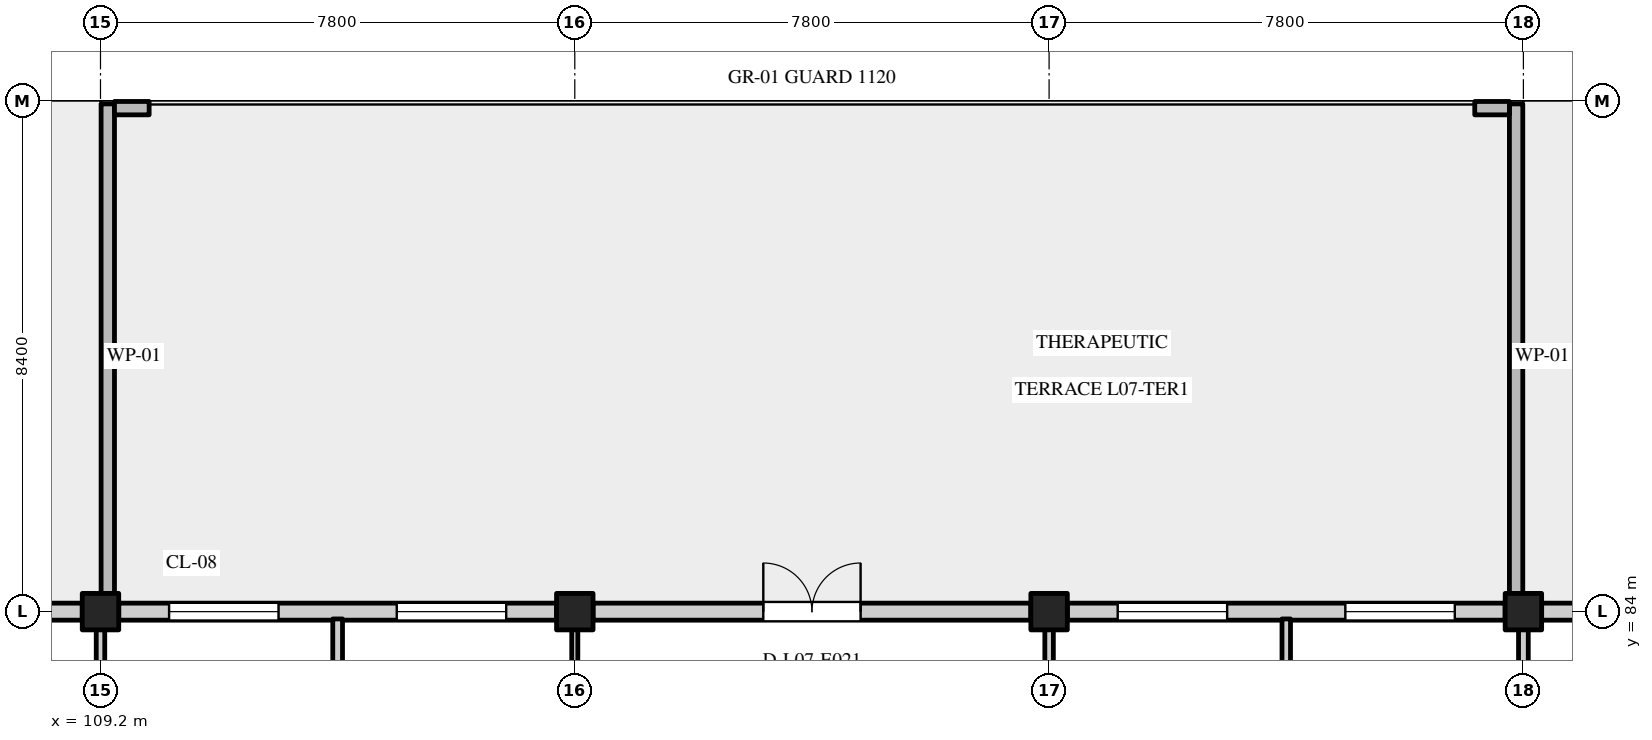
"""IFC4 building model, lengths in metres.
Left out: names, types, materials, properties, quantities, classifications, styles, units other than length and angle.
Written with IfcOpenShell. Run it as: python <this file> out.ifc"""

import sys

from ifc_helpers import new_model, si_unit, direction, frame, frame_2d, origin, origin_2d, place, context, subcontext, project, spatial, rectangle, extrude, element, fill, save


model = new_model("IFC4")
c1 = context("Model", 3, precision=1e-05, world=origin(), true_north=direction((0.0, 1.0)))
c2 = subcontext(c1, "Body", "Model", "MODEL_VIEW")
j1 = project(units=[si_unit("LENGTHUNIT", "METRE"), si_unit("PLANEANGLEUNIT", "RADIAN")], contexts=[c1])
p1 = place(None, origin())
s1 = spatial("IfcSite", under=j1, at=p1, CompositionType="ELEMENT")
p2 = place(p1, origin())
s2 = spatial("IfcBuilding", under=s1, at=p2, CompositionType="ELEMENT")
p3 = place(p2, frame((0.0, 0.0, 29.7)))
s3 = spatial("IfcBuildingStorey", under=s2, at=p3, CompositionType="ELEMENT", Elevation=29.7)
for number, where, z_axis, x_axis in (
    (1, (109.2, 84.0, 0.0), (0.0, 0.0, 1.0), (1.0, 0.0, 0.0)),
    (2, (117.0, 84.0, 0.0), (0.0, 0.0, 1.0), (1.0, 0.0, 0.0)),
    (3, (124.8, 84.0, 0.0), (0.0, 0.0, 1.0), (1.0, 0.0, 0.0)),
    (4, (132.6, 84.0, 0.0), (0.0, 0.0, 1.0), (1.0, 0.0, 0.0)),
):
    element("IfcColumn", number, at=place(p3, frame(where, z_axis=z_axis, x_axis=x_axis)), inside=s3, PredefinedType="COLUMN", context=c2, shape_type="SweptSolid", body=[
        extrude(rectangle(XDim=0.6, YDim=0.6, at=origin_2d()), origin(), (0.0, 0.0, 1.0), 4.2),
    ])
p4 = place(p3, frame((101.7, 84.0, 0.0), z_axis=(0.0, 0.0, 1.0), x_axis=(1.0, 0.0, 0.0)))
e5 = element("IfcWall", 5, at=p4, inside=s3, PredefinedType="STANDARD", context=c2, shape_type="SweptSolid", body=[
    extrude(rectangle(XDim=7.2, YDim=0.28, at=frame_2d((3.6, 0.0))), origin(), (0.0, 0.0, 1.0), 3.25),
])
p5 = place(p4, frame((0.728, 0.0, 0.8)))
e6 = element("IfcOpeningElement", 6, at=p5, cuts=e5, PredefinedType="OPENING", context=c2, shape_type="SweptSolid", body=[
    extrude(rectangle(XDim=2.0, YDim=1.45, at=frame_2d((1.0, 0.725))), frame((0.0, 0.152, 0.0), z_axis=(0.0, -1.0, 0.0), x_axis=(1.0, 0.0, 0.0)), (0.0, 0.0, 1.0), 0.304),
])
p6 = place(p4, frame((4.472, 0.0, 0.8)))
e7 = element("IfcOpeningElement", 7, at=p6, cuts=e5, PredefinedType="OPENING", context=c2, shape_type="SweptSolid", body=[
    extrude(rectangle(XDim=2.0, YDim=1.45, at=frame_2d((1.0, 0.725))), frame((0.0, 0.152, 0.0), z_axis=(0.0, -1.0, 0.0), x_axis=(1.0, 0.0, 0.0)), (0.0, 0.0, 1.0), 0.304),
])
p7 = place(p3, frame((109.5, 84.0, 0.0), z_axis=(0.0, 0.0, 1.0), x_axis=(1.0, 0.0, 0.0)))
e8 = element("IfcWall", 8, at=p7, inside=s3, PredefinedType="STANDARD", context=c2, shape_type="SweptSolid", body=[
    extrude(rectangle(XDim=7.2, YDim=0.28, at=frame_2d((3.6, 0.0))), origin(), (0.0, 0.0, 1.0), 3.25),
])
p8 = place(p7, frame((0.828, 0.0, 0.8)))
e9 = element("IfcOpeningElement", 9, at=p8, cuts=e8, PredefinedType="OPENING", context=c2, shape_type="SweptSolid", body=[
    extrude(rectangle(XDim=1.8, YDim=1.75, at=frame_2d((0.9, 0.875))), frame((0.0, 0.152, 0.0), z_axis=(0.0, -1.0, 0.0), x_axis=(1.0, 0.0, 0.0)), (0.0, 0.0, 1.0), 0.304),
])
p9 = place(p7, frame((4.572, 0.0, 0.8)))
e10 = element("IfcOpeningElement", 10, at=p9, cuts=e8, PredefinedType="OPENING", context=c2, shape_type="SweptSolid", body=[
    extrude(rectangle(XDim=1.8, YDim=1.75, at=frame_2d((0.9, 0.875))), frame((0.0, 0.152, 0.0), z_axis=(0.0, -1.0, 0.0), x_axis=(1.0, 0.0, 0.0)), (0.0, 0.0, 1.0), 0.304),
])
p10 = place(p3, frame((117.3, 84.0, 0.0), z_axis=(0.0, 0.0, 1.0), x_axis=(1.0, 0.0, 0.0)))
e11 = element("IfcWall", 11, at=p10, inside=s3, PredefinedType="STANDARD", context=c2, shape_type="SweptSolid", body=[
    extrude(rectangle(XDim=7.2, YDim=0.28, at=frame_2d((3.6, 0.0))), origin(), (0.0, 0.0, 1.0), 3.25),
])
p11 = place(p10, frame((2.8, 0.0, 0.0)))
e12 = element("IfcOpeningElement", 12, at=p11, cuts=e11, PredefinedType="OPENING", context=c2, shape_type="SweptSolid", body=[
    extrude(rectangle(XDim=1.6, YDim=2.15, at=frame_2d((0.8, 1.075))), frame((0.0, 0.152, 0.0), z_axis=(0.0, -1.0, 0.0), x_axis=(1.0, 0.0, 0.0)), (0.0, 0.0, 1.0), 0.304),
])
p12 = place(p3, frame((125.1, 84.0, 0.0), z_axis=(0.0, 0.0, 1.0), x_axis=(1.0, 0.0, 0.0)))
e13 = element("IfcWall", 13, at=p12, inside=s3, PredefinedType="STANDARD", context=c2, shape_type="SweptSolid", body=[
    extrude(rectangle(XDim=7.2, YDim=0.28, at=frame_2d((3.6, 0.0))), origin(), (0.0, 0.0, 1.0), 3.25),
])
p13 = place(p12, frame((0.828, 0.0, 0.8)))
e14 = element("IfcOpeningElement", 14, at=p13, cuts=e13, PredefinedType="OPENING", context=c2, shape_type="SweptSolid", body=[
    extrude(rectangle(XDim=1.8, YDim=1.55, at=frame_2d((0.9, 0.775))), frame((0.0, 0.152, 0.0), z_axis=(0.0, -1.0, 0.0), x_axis=(1.0, 0.0, 0.0)), (0.0, 0.0, 1.0), 0.304),
])
p14 = place(p12, frame((4.572, 0.0, 0.8)))
e15 = element("IfcOpeningElement", 15, at=p14, cuts=e13, PredefinedType="OPENING", context=c2, shape_type="SweptSolid", body=[
    extrude(rectangle(XDim=1.8, YDim=1.55, at=frame_2d((0.9, 0.775))), frame((0.0, 0.152, 0.0), z_axis=(0.0, -1.0, 0.0), x_axis=(1.0, 0.0, 0.0)), (0.0, 0.0, 1.0), 0.304),
])
p15 = place(p3, frame((132.9, 84.0, 0.0), z_axis=(0.0, 0.0, 1.0), x_axis=(1.0, 0.0, 0.0)))
e16 = element("IfcWall", 16, at=p15, inside=s3, PredefinedType="STANDARD", context=c2, shape_type="SweptSolid", body=[
    extrude(rectangle(XDim=7.2, YDim=0.28, at=frame_2d((3.6, 0.0))), origin(), (0.0, 0.0, 1.0), 3.25),
])
p16 = place(p15, frame((0.828, 0.0, 0.8)))
e17 = element("IfcOpeningElement", 17, at=p16, cuts=e16, PredefinedType="OPENING", context=c2, shape_type="SweptSolid", body=[
    extrude(rectangle(XDim=1.8, YDim=1.45, at=frame_2d((0.9, 0.725))), frame((0.0, 0.152, 0.0), z_axis=(0.0, -1.0, 0.0), x_axis=(1.0, 0.0, 0.0)), (0.0, 0.0, 1.0), 0.304),
])
p17 = place(p15, frame((4.572, 0.0, 0.8)))
e18 = element("IfcOpeningElement", 18, at=p17, cuts=e16, PredefinedType="OPENING", context=c2, shape_type="SweptSolid", body=[
    extrude(rectangle(XDim=1.8, YDim=1.45, at=frame_2d((0.9, 0.725))), frame((0.0, 0.152, 0.0), z_axis=(0.0, -1.0, 0.0), x_axis=(1.0, 0.0, 0.0)), (0.0, 0.0, 1.0), 0.304),
])
for number, where, z_axis, x_axis in (
    (19, (109.32, 84.05, 0.0), (0.0, 0.0, 1.0), (0.0, 1.0, 0.0)),
    (20, (132.48, 84.05, 0.0), (0.0, 0.0, 1.0), (0.0, 1.0, 0.0)),
):
    element("IfcWall", number, at=place(p3, frame(where, z_axis=z_axis, x_axis=x_axis)), inside=s3, PredefinedType="PARAPET", context=c2, shape_type="SweptSolid", body=[
        extrude(rectangle(XDim=8.3, YDim=0.22, at=frame_2d((4.15, 0.0))), origin(), (0.0, 0.0, 1.0), 1.15),
    ])
for number, where, z_axis, x_axis in (
    (21, (109.43, 92.28, 0.0), (0.0, 0.0, 1.0), (1.0, 0.0, 0.0)),
    (22, (131.8, 92.28, 0.0), (0.0, 0.0, 1.0), (1.0, 0.0, 0.0)),
):
    element("IfcWall", number, at=place(p3, frame(where, z_axis=z_axis, x_axis=x_axis)), inside=s3, PredefinedType="PARAPET", context=c2, shape_type="SweptSolid", body=[
        extrude(rectangle(XDim=0.57, YDim=0.22, at=frame_2d((0.285, 0.0))), origin(), (0.0, 0.0, 1.0), 1.15),
    ])
p18 = place(p3, frame((109.2, 75.72, 0.0), z_axis=(0.0, 0.0, 1.0), x_axis=(0.0, 1.0, 0.0)))
e23 = element("IfcWall", 23, at=p18, inside=s3, PredefinedType="PARTITIONING", context=c2, shape_type="SweptSolid", body=[
    extrude(rectangle(XDim=8.16, YDim=0.14, at=frame_2d((4.08, 0.0))), origin(), (0.0, 0.0, 1.0), 3.88),
])
p19 = place(p3, frame((113.1, 75.72, 0.0), z_axis=(0.0, 0.0, 1.0), x_axis=(0.0, 1.0, 0.0)))
e24 = element("IfcWall", 24, at=p19, inside=s3, PredefinedType="PARTITIONING", context=c2, shape_type="SweptSolid", body=[
    extrude(rectangle(XDim=8.16, YDim=0.16, at=frame_2d((4.08, 0.0))), origin(), (0.0, 0.0, 1.0), 3.88),
])
p20 = place(p3, frame((117.0, 75.72, 0.0), z_axis=(0.0, 0.0, 1.0), x_axis=(0.0, 1.0, 0.0)))
e25 = element("IfcWall", 25, at=p20, inside=s3, PredefinedType="PARTITIONING", context=c2, shape_type="SweptSolid", body=[
    extrude(rectangle(XDim=8.16, YDim=0.1, at=frame_2d((4.08, 0.0))), origin(), (0.0, 0.0, 1.0), 3.25),
])
for number, where, z_axis, x_axis in (
    (26, (124.8, 75.72, 0.0), (0.0, 0.0, 1.0), (0.0, 1.0, 0.0)),
    (27, (128.7, 75.72, 0.0), (0.0, 0.0, 1.0), (0.0, 1.0, 0.0)),
):
    element("IfcWall", number, at=place(p3, frame(where, z_axis=z_axis, x_axis=x_axis)), inside=s3, PredefinedType="PARTITIONING", context=c2, shape_type="SweptSolid", body=[
        extrude(rectangle(XDim=8.16, YDim=0.14, at=frame_2d((4.08, 0.0))), origin(), (0.0, 0.0, 1.0), 3.88),
    ])
p21 = place(p3, frame((132.6, 75.72, 0.0), z_axis=(0.0, 0.0, 1.0), x_axis=(0.0, 1.0, 0.0)))
e28 = element("IfcWall", 28, at=p21, inside=s3, PredefinedType="PARTITIONING", context=c2, shape_type="SweptSolid", body=[
    extrude(rectangle(XDim=8.16, YDim=0.16, at=frame_2d((4.08, 0.0))), origin(), (0.0, 0.0, 1.0), 3.25),
])
p22 = place(p8, origin())
e29 = element("IfcWindow", 29, at=p22, inside=s3, PartitioningType="DOUBLE_PANEL_VERTICAL", PredefinedType="WINDOW", context=c2, shape_type="SweptSolid", body=[
    extrude(rectangle(XDim=1.8, YDim=1.75, at=frame_2d((0.9, 0.875))), frame((0.0, 0.03, 0.0), z_axis=(0.0, -1.0, 0.0), x_axis=(1.0, 0.0, 0.0)), (0.0, 0.0, 1.0), 0.06),
])
fill(e9, e29)
p23 = place(p9, origin())
e30 = element("IfcWindow", 30, at=p23, inside=s3, PartitioningType="DOUBLE_PANEL_VERTICAL", PredefinedType="WINDOW", context=c2, shape_type="SweptSolid", body=[
    extrude(rectangle(XDim=1.8, YDim=1.75, at=frame_2d((0.9, 0.875))), frame((0.0, 0.03, 0.0), z_axis=(0.0, -1.0, 0.0), x_axis=(1.0, 0.0, 0.0)), (0.0, 0.0, 1.0), 0.06),
])
fill(e10, e30)
p24 = place(p11, origin())
e31 = element("IfcDoor", 31, at=p24, inside=s3, OperationType="DOUBLE_DOOR_SINGLE_SWING", PredefinedType="DOOR", context=c2, shape_type="SweptSolid", body=[
    extrude(rectangle(XDim=1.6, YDim=2.15, at=frame_2d((0.8, 1.075))), frame((0.0, 0.025, 0.0), z_axis=(0.0, -1.0, 0.0), x_axis=(1.0, 0.0, 0.0)), (0.0, 0.0, 1.0), 0.05),
])
fill(e12, e31)
p25 = place(p13, origin())
e32 = element("IfcWindow", 32, at=p25, inside=s3, PartitioningType="DOUBLE_PANEL_VERTICAL", PredefinedType="WINDOW", context=c2, shape_type="SweptSolid", body=[
    extrude(rectangle(XDim=1.8, YDim=1.55, at=frame_2d((0.9, 0.775))), frame((0.0, 0.03, 0.0), z_axis=(0.0, -1.0, 0.0), x_axis=(1.0, 0.0, 0.0)), (0.0, 0.0, 1.0), 0.06),
])
fill(e14, e32)
p26 = place(p14, origin())
e33 = element("IfcWindow", 33, at=p26, inside=s3, PartitioningType="DOUBLE_PANEL_VERTICAL", PredefinedType="WINDOW", context=c2, shape_type="SweptSolid", body=[
    extrude(rectangle(XDim=1.8, YDim=1.55, at=frame_2d((0.9, 0.775))), frame((0.0, 0.03, 0.0), z_axis=(0.0, -1.0, 0.0), x_axis=(1.0, 0.0, 0.0)), (0.0, 0.0, 1.0), 0.06),
])
fill(e15, e33)
save(model, sys.argv[1])
